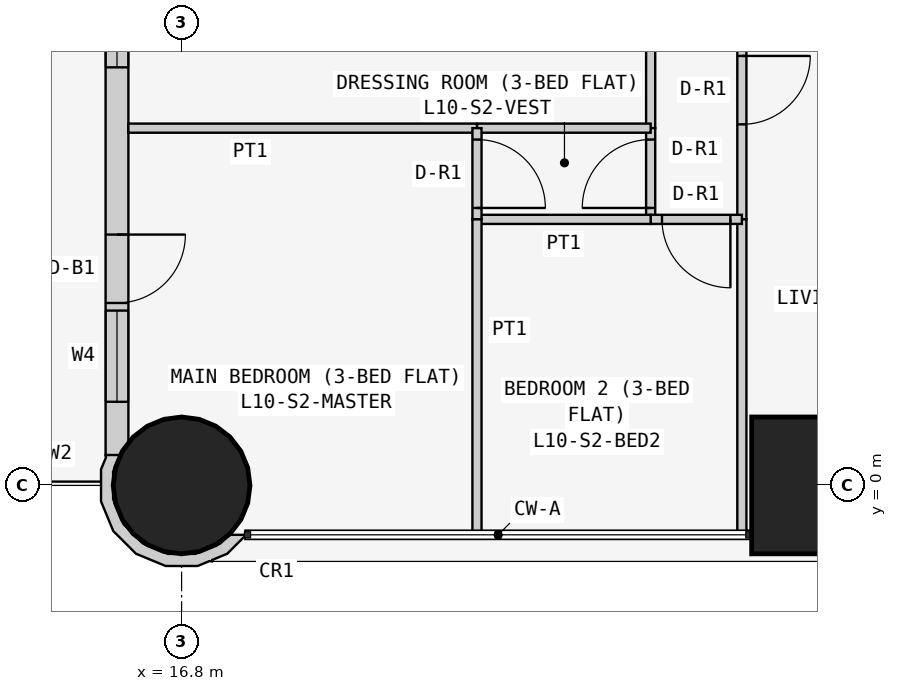
"""IFC4 building model, lengths in metres.
Left out: names, types, materials, properties, quantities, classifications, styles, units other than length and angle.
Written with IfcOpenShell. Run it as: python <this file> out.ifc"""

import sys

from ifc_helpers import new_model, si_unit, direction, frame, frame_2d, origin, origin_2d, place, context, subcontext, project, spatial, polyline, rectangle, circle, outline, extrude, element, fill, save


model = new_model("IFC4")
c1 = context("Model", 3, precision=1e-05, world=origin(), true_north=direction((0.0, 1.0)))
c2 = subcontext(c1, "Body", "Model", "MODEL_VIEW")
j1 = project(units=[si_unit("LENGTHUNIT", "METRE"), si_unit("PLANEANGLEUNIT", "RADIAN")], contexts=[c1])
p1 = place(None, origin())
s1 = spatial("IfcSite", under=j1, at=p1, CompositionType="ELEMENT")
p2 = place(p1, origin())
s2 = spatial("IfcBuilding", under=s1, at=p2, CompositionType="ELEMENT")
p3 = place(p2, frame((0.0, 0.0, 45.3)))
s3 = spatial("IfcBuildingStorey", under=s2, at=p3, CompositionType="ELEMENT", Elevation=45.3)
p4 = place(p3, frame((16.8, 0.0, 0.0), z_axis=(0.0, 0.0, 1.0), x_axis=(1.0, 0.0, 0.0)))
e1 = element("IfcColumn", 1, at=p4, inside=s3, PredefinedType="COLUMN", context=c2, shape_type="SweptSolid", body=[
    extrude(circle(Radius=0.9, at=origin_2d()), origin(), (0.0, 0.0, 1.0), 3.6),
])
p5 = place(p3, frame((25.2, 0.0, 0.0), z_axis=(0.0, 0.0, 1.0), x_axis=(1.0, 0.0, 0.0)))
e2 = element("IfcColumn", 2, at=p5, inside=s3, PredefinedType="COLUMN", context=c2, shape_type="SweptSolid", body=[
    extrude(rectangle(XDim=1.8, YDim=1.8, at=origin_2d()), origin(), (0.0, 0.0, 1.0), 3.6),
])
p6 = place(p3, frame((15.95, 15.8, 0.0), z_axis=(0.0, 0.0, 1.0), x_axis=(0.0, -1.0, 0.0)))
e3 = element("IfcWall", 3, at=p6, inside=s3, PredefinedType="SOLIDWALL", context=c2, shape_type="SweptSolid", body=[
    extrude(rectangle(XDim=15.4, YDim=0.3, at=frame_2d((7.7, 0.0))), origin(), (0.0, 0.0, 1.0), 3.45),
])
p7 = place(p6, frame((1.2, 0.0, 0.9)))
e4 = element("IfcOpeningElement", 4, at=p7, cuts=e3, PredefinedType="OPENING", context=c2, shape_type="SweptSolid", body=[
    extrude(rectangle(XDim=1.8, YDim=1.5, at=frame_2d((0.9, 0.75))), frame((0.0, 0.16, 0.0), z_axis=(0.0, -1.0, 0.0), x_axis=(1.0, 0.0, 0.0)), (0.0, 0.0, 1.0), 0.32),
])
p8 = place(p6, frame((4.95, 0.0, 1.5)))
e5 = element("IfcOpeningElement", 5, at=p8, cuts=e3, PredefinedType="OPENING", context=c2, shape_type="SweptSolid", body=[
    extrude(rectangle(XDim=0.9, YDim=0.7, at=frame_2d((0.45, 0.35))), frame((0.0, 0.16, 0.0), z_axis=(0.0, -1.0, 0.0), x_axis=(1.0, 0.0, 0.0)), (0.0, 0.0, 1.0), 0.32),
])
p9 = place(p6, frame((8.5, 0.0, 0.9)))
e6 = element("IfcOpeningElement", 6, at=p9, cuts=e3, PredefinedType="OPENING", context=c2, shape_type="SweptSolid", body=[
    extrude(rectangle(XDim=1.8, YDim=1.5, at=frame_2d((0.9, 0.75))), frame((0.0, 0.16, 0.0), z_axis=(0.0, -1.0, 0.0), x_axis=(1.0, 0.0, 0.0)), (0.0, 0.0, 1.0), 0.32),
])
p10 = place(p6, frame((12.5, 0.0, 0.0)))
e7 = element("IfcOpeningElement", 7, at=p10, cuts=e3, PredefinedType="OPENING", context=c2, shape_type="SweptSolid", body=[
    extrude(rectangle(XDim=0.9, YDim=2.4, at=frame_2d((0.45, 1.2))), frame((0.0, 0.16, 0.0), z_axis=(0.0, -1.0, 0.0), x_axis=(1.0, 0.0, 0.0)), (0.0, 0.0, 1.0), 0.32),
])
p11 = place(p6, frame((13.5, 0.0, 0.9)))
e8 = element("IfcOpeningElement", 8, at=p11, cuts=e3, PredefinedType="OPENING", context=c2, shape_type="SweptSolid", body=[
    extrude(rectangle(XDim=1.2, YDim=1.5, at=frame_2d((0.6, 0.75))), frame((0.0, 0.16, 0.0), z_axis=(0.0, -1.0, 0.0), x_axis=(1.0, 0.0, 0.0)), (0.0, 0.0, 1.0), 0.32),
])
p12 = place(p3, frame((15.89, 0.364, 0.0), z_axis=(0.0, 0.0, 1.0), x_axis=(-0.377204953059, -0.926129809145, 0.0)))
e9 = element("IfcWall", 9, at=p12, inside=s3, PredefinedType="SOLIDWALL", context=c2, shape_type="SweptSolid", body=[
    extrude(outline(polyline([(0.36, 1.803), (0.509, 1.741), (0.761, 1.486), (0.896, 1.154), (0.894, 0.795), (0.755, 0.465), (0.5, 0.213), (0.168, 0.078), (-0.1, 0.08), (0.001, -0.097), (0.03, -0.08), (0.199, -0.081), (0.589, 0.078), (0.889, 0.374), (1.053, 0.763), (1.055, 1.185), (0.896, 1.575), (0.778, 1.695), (0.769, 1.728), (0.75, 1.723), (0.6, 1.875), (0.295, 2.004), (0.281, 1.998), (0.36, 1.803)])), origin(), (0.0, 0.0, 1.0), 3.45),
])
p13 = place(p3, frame((24.171, 3.5, 0.0), z_axis=(0.0, 0.0, 1.0), x_axis=(0.0, 1.0, 0.0)))
e10 = element("IfcWall", 10, at=p13, inside=s3, PredefinedType="PARTITIONING", context=c2, shape_type="SweptSolid", body=[
    extrude(rectangle(XDim=4.9, YDim=0.12, at=frame_2d((2.45, 0.0))), origin(), (0.0, 0.0, 1.0), 3.45),
])
p14 = place(p13, frame((1.25, 0.0, 0.0)))
e11 = element("IfcOpeningElement", 11, at=p14, cuts=e10, PredefinedType="OPENING", context=c2, shape_type="SweptSolid", body=[
    extrude(rectangle(XDim=0.9, YDim=2.1, at=frame_2d((0.45, 1.05))), frame((0.0, 0.07, 0.0), z_axis=(0.0, -1.0, 0.0), x_axis=(1.0, 0.0, 0.0)), (0.0, 0.0, 1.0), 0.14),
])
p15 = place(p3, frame((24.171, -0.65, 0.0), z_axis=(0.0, 0.0, 1.0), x_axis=(0.0, 1.0, 0.0)))
e12 = element("IfcWall", 12, at=p15, inside=s3, PredefinedType="PARTITIONING", context=c2, shape_type="SweptSolid", body=[
    extrude(rectangle(XDim=4.15, YDim=0.12, at=frame_2d((2.075, 0.0))), origin(), (0.0, 0.0, 1.0), 3.45),
])
p16 = place(p3, frame((22.971, 4.7, 0.0), z_axis=(0.0, 0.0, 1.0), x_axis=(0.0, 1.0, 0.0)))
e13 = element("IfcWall", 13, at=p16, inside=s3, PredefinedType="PARTITIONING", context=c2, shape_type="SweptSolid", body=[
    extrude(rectangle(XDim=4.9, YDim=0.12, at=frame_2d((2.45, 0.0))), origin(), (0.0, 0.0, 1.0), 3.45),
])
p17 = place(p16, frame((1.65, 0.0, 0.0)))
e14 = element("IfcOpeningElement", 14, at=p17, cuts=e13, PredefinedType="OPENING", context=c2, shape_type="SweptSolid", body=[
    extrude(rectangle(XDim=0.9, YDim=2.1, at=frame_2d((0.45, 1.05))), frame((0.0, 0.07, 0.0), z_axis=(0.0, -1.0, 0.0), x_axis=(1.0, 0.0, 0.0)), (0.0, 0.0, 1.0), 0.14),
])
p18 = place(p3, frame((22.971, 3.5, 0.0), z_axis=(0.0, 0.0, 1.0), x_axis=(0.0, 1.0, 0.0)))
e15 = element("IfcWall", 15, at=p18, inside=s3, PredefinedType="PARTITIONING", context=c2, shape_type="SweptSolid", body=[
    extrude(rectangle(XDim=1.2, YDim=0.12, at=frame_2d((0.6, 0.0))), origin(), (0.0, 0.0, 1.0), 3.45),
])
p19 = place(p18, frame((0.15, 0.0, 0.0)))
e16 = element("IfcOpeningElement", 16, at=p19, cuts=e15, PredefinedType="OPENING", context=c2, shape_type="SweptSolid", body=[
    extrude(rectangle(XDim=0.9, YDim=2.1, at=frame_2d((0.45, 1.05))), frame((0.0, 0.07, 0.0), z_axis=(0.0, -1.0, 0.0), x_axis=(1.0, 0.0, 0.0)), (0.0, 0.0, 1.0), 0.14),
])
p20 = place(p3, frame((24.171, 3.5, 0.0), z_axis=(0.0, 0.0, 1.0), x_axis=(-1.0, 0.0, 0.0)))
e17 = element("IfcWall", 17, at=p20, inside=s3, PredefinedType="PARTITIONING", context=c2, shape_type="SweptSolid", body=[
    extrude(rectangle(XDim=1.2, YDim=0.12, at=frame_2d((0.6, 0.0))), origin(), (0.0, 0.0, 1.0), 3.45),
])
p21 = place(p20, frame((0.151, 0.0, 0.0)))
e18 = element("IfcOpeningElement", 18, at=p21, cuts=e17, PredefinedType="OPENING", context=c2, shape_type="SweptSolid", body=[
    extrude(rectangle(XDim=0.9, YDim=2.1, at=frame_2d((0.45, 1.05))), frame((0.0, 0.07, 0.0), z_axis=(0.0, -1.0, 0.0), x_axis=(1.0, 0.0, 0.0)), (0.0, 0.0, 1.0), 0.14),
])
p22 = place(p3, frame((22.971, 4.7, 0.0), z_axis=(0.0, 0.0, 1.0), x_axis=(-1.0, 0.0, 0.0)))
e19 = element("IfcWall", 19, at=p22, inside=s3, PredefinedType="PARTITIONING", context=c2, shape_type="SweptSolid", body=[
    extrude(rectangle(XDim=2.285, YDim=0.12, at=frame_2d((1.143, 0.0))), origin(), (0.0, 0.0, 1.0), 3.45),
])
p23 = place(p3, frame((20.686, 4.7, 0.0), z_axis=(0.0, 0.0, 1.0), x_axis=(-1.0, 0.0, 0.0)))
e20 = element("IfcWall", 20, at=p23, inside=s3, PredefinedType="PARTITIONING", context=c2, shape_type="SweptSolid", body=[
    extrude(rectangle(XDim=4.586, YDim=0.12, at=frame_2d((2.293, 0.0))), origin(), (0.0, 0.0, 1.0), 3.45),
])
p24 = place(p3, frame((22.971, 3.5, 0.0), z_axis=(0.0, 0.0, 1.0), x_axis=(-1.0, 0.0, 0.0)))
e21 = element("IfcWall", 21, at=p24, inside=s3, PredefinedType="PARTITIONING", context=c2, shape_type="SweptSolid", body=[
    extrude(rectangle(XDim=2.285, YDim=0.12, at=frame_2d((1.143, 0.0))), origin(), (0.0, 0.0, 1.0), 3.45),
])
p25 = place(p3, frame((20.686, 3.5, 0.0), z_axis=(0.0, 0.0, 1.0), x_axis=(0.0, 1.0, 0.0)))
e22 = element("IfcWall", 22, at=p25, inside=s3, PredefinedType="PARTITIONING", context=c2, shape_type="SweptSolid", body=[
    extrude(rectangle(XDim=1.2, YDim=0.12, at=frame_2d((0.6, 0.0))), origin(), (0.0, 0.0, 1.0), 3.45),
])
p26 = place(p25, frame((0.15, 0.0, 0.0)))
e23 = element("IfcOpeningElement", 23, at=p26, cuts=e22, PredefinedType="OPENING", context=c2, shape_type="SweptSolid", body=[
    extrude(rectangle(XDim=0.9, YDim=2.1, at=frame_2d((0.45, 1.05))), frame((0.0, 0.07, 0.0), z_axis=(0.0, -1.0, 0.0), x_axis=(1.0, 0.0, 0.0)), (0.0, 0.0, 1.0), 0.14),
])
p27 = place(p3, frame((20.686, -0.65, 0.0), z_axis=(0.0, 0.0, 1.0), x_axis=(0.0, 1.0, 0.0)))
e24 = element("IfcWall", 24, at=p27, inside=s3, PredefinedType="PARTITIONING", context=c2, shape_type="SweptSolid", body=[
    extrude(rectangle(XDim=4.15, YDim=0.12, at=frame_2d((2.075, 0.0))), origin(), (0.0, 0.0, 1.0), 3.45),
])
p28 = place(p9, origin())
e25 = element("IfcWindow", 25, at=p28, inside=s3, PartitioningType="SINGLE_PANEL", PredefinedType="WINDOW", context=c2, shape_type="SweptSolid", body=[
    extrude(rectangle(XDim=1.8, YDim=1.5, at=frame_2d((0.9, 0.75))), frame((0.0, 0.03, 0.0), z_axis=(0.0, -1.0, 0.0), x_axis=(1.0, 0.0, 0.0)), (0.0, 0.0, 1.0), 0.06),
])
fill(e6, e25)
p29 = place(p10, origin())
e26 = element("IfcDoor", 26, at=p29, inside=s3, OperationType="SINGLE_SWING_LEFT", PredefinedType="DOOR", context=c2, shape_type="SweptSolid", body=[
    extrude(rectangle(XDim=0.9, YDim=2.4, at=frame_2d((0.45, 1.2))), frame((0.0, 0.025, 0.0), z_axis=(0.0, -1.0, 0.0), x_axis=(1.0, 0.0, 0.0)), (0.0, 0.0, 1.0), 0.05),
])
fill(e7, e26)
p30 = place(p11, origin())
e27 = element("IfcWindow", 27, at=p30, inside=s3, PartitioningType="SINGLE_PANEL", PredefinedType="WINDOW", context=c2, shape_type="SweptSolid", body=[
    extrude(rectangle(XDim=1.2, YDim=1.5, at=frame_2d((0.6, 0.75))), frame((0.0, 0.03, 0.0), z_axis=(0.0, -1.0, 0.0), x_axis=(1.0, 0.0, 0.0)), (0.0, 0.0, 1.0), 0.06),
])
fill(e8, e27)
p31 = place(p14, frame((0.9, 0.0, 0.0), z_axis=(0.0, 0.0, 1.0), x_axis=(-1.0, 0.0, 0.0)))
e28 = element("IfcDoor", 28, at=p31, inside=s3, OperationType="SINGLE_SWING_LEFT", PredefinedType="DOOR", context=c2, shape_type="SweptSolid", body=[
    extrude(rectangle(XDim=0.9, YDim=2.1, at=frame_2d((0.45, 1.05))), frame((0.0, 0.025, 0.0), z_axis=(0.0, -1.0, 0.0), x_axis=(1.0, 0.0, 0.0)), (0.0, 0.0, 1.0), 0.05),
])
fill(e11, e28)
p32 = place(p19, origin())
e29 = element("IfcDoor", 29, at=p32, inside=s3, OperationType="SINGLE_SWING_LEFT", PredefinedType="DOOR", context=c2, shape_type="SweptSolid", body=[
    extrude(rectangle(XDim=0.9, YDim=2.1, at=frame_2d((0.45, 1.05))), frame((0.0, 0.025, 0.0), z_axis=(0.0, -1.0, 0.0), x_axis=(1.0, 0.0, 0.0)), (0.0, 0.0, 1.0), 0.05),
])
fill(e16, e29)
p33 = place(p26, frame((0.9, 0.0, 0.0), z_axis=(0.0, 0.0, 1.0), x_axis=(-1.0, 0.0, 0.0)))
e30 = element("IfcDoor", 30, at=p33, inside=s3, OperationType="SINGLE_SWING_RIGHT", PredefinedType="DOOR", context=c2, shape_type="SweptSolid", body=[
    extrude(rectangle(XDim=0.9, YDim=2.1, at=frame_2d((0.45, 1.05))), frame((0.0, 0.025, 0.0), z_axis=(0.0, -1.0, 0.0), x_axis=(1.0, 0.0, 0.0)), (0.0, 0.0, 1.0), 0.05),
])
fill(e23, e30)
p34 = place(p21, origin())
e31 = element("IfcDoor", 31, at=p34, inside=s3, OperationType="SINGLE_SWING_LEFT", PredefinedType="DOOR", context=c2, shape_type="SweptSolid", body=[
    extrude(rectangle(XDim=0.9, YDim=2.1, at=frame_2d((0.45, 1.05))), frame((0.0, 0.025, 0.0), z_axis=(0.0, -1.0, 0.0), x_axis=(1.0, 0.0, 0.0)), (0.0, 0.0, 1.0), 0.05),
])
fill(e18, e31)
save(model, sys.argv[1])
